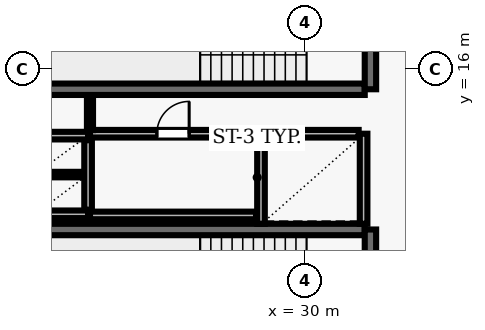
"""IFC4 building model, lengths in metres.
Left out: names, types, materials, properties, quantities, classifications, styles, units other than length and angle.
Written with IfcOpenShell. Run it as: python <this file> out.ifc"""

import sys

from ifc_helpers import new_model, si_unit, direction, frame, frame_2d, origin, place, context, subcontext, project, spatial, rectangle, extrude, element, fill, save


model = new_model("IFC4")
c1 = context("Model", 3, precision=1e-05, world=origin(), true_north=direction((0.0, 1.0)))
c2 = subcontext(c1, "Body", "Model", "MODEL_VIEW")
j1 = project(units=[si_unit("LENGTHUNIT", "METRE"), si_unit("PLANEANGLEUNIT", "RADIAN")], contexts=[c1])
p1 = place(None, origin())
s1 = spatial("IfcSite", under=j1, at=p1, CompositionType="ELEMENT")
p2 = place(p1, origin())
s2 = spatial("IfcBuilding", under=s1, at=p2, CompositionType="ELEMENT")
p3 = place(p2, frame((0.0, 0.0, 150.2)))
s3 = spatial("IfcBuildingStorey", under=s2, at=p3, CompositionType="ELEMENT", Elevation=150.2)
p4 = place(p3, frame((23.22, 15.47, 0.0), z_axis=(0.0, 0.0, 1.0), x_axis=(1.0, 0.0, 0.0)))
e1 = element("IfcWall", 1, at=p4, inside=s3, PredefinedType="SHEAR", context=c2, shape_type="SweptSolid", body=[
    extrude(rectangle(XDim=8.36, YDim=0.3, at=frame_2d((4.18, 0.0))), origin(), (0.0, 0.0, 1.0), 3.69),
])
p5 = place(p3, frame((31.73, 15.47, 0.0), z_axis=(0.0, 0.0, 1.0), x_axis=(0.0, 1.0, 0.0)))
e2 = element("IfcWall", 2, at=p5, inside=s3, PredefinedType="SHEAR", context=c2, shape_type="SweptSolid", body=[
    extrude(rectangle(XDim=3.51, YDim=0.3, at=frame_2d((1.755, 0.0))), origin(), (0.0, 0.0, 1.0), 3.69),
])
p6 = place(p5, frame((1.18, 0.0, 0.0)))
e3 = element("IfcOpeningElement", 3, at=p6, cuts=e2, PredefinedType="OPENING", context=c2, shape_type="SweptSolid", body=[
    extrude(rectangle(XDim=1.15, YDim=2.15, at=frame_2d((0.575, 1.075))), frame((0.0, 0.16, 0.0), z_axis=(0.0, -1.0, 0.0), x_axis=(1.0, 0.0, 0.0)), (0.0, 0.0, 1.0), 0.32),
])
p7 = place(p3, frame((31.58, 11.78, 0.0), z_axis=(0.0, 0.0, 1.0), x_axis=(-1.0, 0.0, 0.0)))
e4 = element("IfcWall", 4, at=p7, inside=s3, PredefinedType="SHEAR", context=c2, shape_type="SweptSolid", body=[
    extrude(rectangle(XDim=8.36, YDim=0.3, at=frame_2d((4.18, 0.0))), origin(), (0.0, 0.0, 1.0), 3.69),
])
p8 = place(p3, frame((31.73, 8.27, 0.0), z_axis=(0.0, 0.0, 1.0), x_axis=(0.0, 1.0, 0.0)))
e5 = element("IfcWall", 5, at=p8, inside=s3, PredefinedType="SHEAR", context=c2, shape_type="SweptSolid", body=[
    extrude(rectangle(XDim=3.51, YDim=0.3, at=frame_2d((1.755, 0.0))), origin(), (0.0, 0.0, 1.0), 3.69),
])
p9 = place(p8, frame((1.18, 0.0, 0.0)))
e6 = element("IfcOpeningElement", 6, at=p9, cuts=e5, PredefinedType="OPENING", context=c2, shape_type="SweptSolid", body=[
    extrude(rectangle(XDim=1.15, YDim=2.15, at=frame_2d((0.575, 1.075))), frame((0.0, 0.16, 0.0), z_axis=(0.0, -1.0, 0.0), x_axis=(1.0, 0.0, 0.0)), (0.0, 0.0, 1.0), 0.32),
])
for number, where, z_axis, x_axis in (
    (7, (28.85, 14.3, 0.0), (0.0, 0.0, 1.0), (0.0, -1.0, 0.0)),
    (8, (31.55, 11.93, 0.0), (0.0, 0.0, 1.0), (0.0, 1.0, 0.0)),
):
    element("IfcWall", number, at=place(p3, frame(where, z_axis=z_axis, x_axis=x_axis)), inside=s3, PredefinedType="SOLIDWALL", context=c2, shape_type="SweptSolid", body=[
        extrude(rectangle(XDim=2.37, YDim=0.2, at=frame_2d((1.185, 0.0))), origin(), (0.0, 0.0, 1.0), 3.69),
    ])
p10 = place(p3, frame((31.42, 14.3, 0.0), z_axis=(0.0, 0.0, 1.0), x_axis=(-1.0, 0.0, 0.0)))
e9 = element("IfcWall", 9, at=p10, inside=s3, PredefinedType="SOLIDWALL", context=c2, shape_type="SweptSolid", body=[
    extrude(rectangle(XDim=2.44, YDim=0.2, at=frame_2d((1.22, 0.0))), origin(), (0.0, 0.0, 1.0), 3.69),
])
for number, where, z_axis, x_axis in (
    (10, (22.9, 14.25, 0.0), (0.0, 0.0, 1.0), (1.0, 0.0, 0.0)),
    (11, (22.9, 12.18, 0.0), (0.0, 0.0, 1.0), (1.0, 0.0, 0.0)),
):
    element("IfcWall", number, at=place(p3, frame(where, z_axis=z_axis, x_axis=x_axis)), inside=s3, PredefinedType="SOLIDWALL", context=c2, shape_type="SweptSolid", body=[
        extrude(rectangle(XDim=1.4, YDim=0.2, at=frame_2d((0.7, 0.0))), origin(), (0.0, 0.0, 1.0), 3.69),
    ])
p11 = place(p3, frame((24.3, 12.3, 0.0), z_axis=(0.0, 0.0, 1.0), x_axis=(0.0, 1.0, 0.0)))
e12 = element("IfcWall", 12, at=p11, inside=s3, PredefinedType="SOLIDWALL", context=c2, shape_type="SweptSolid", body=[
    extrude(rectangle(XDim=1.83, YDim=0.2, at=frame_2d((0.915, 0.0))), origin(), (0.0, 0.0, 1.0), 3.69),
])
p12 = place(p3, frame((23.01, 13.225, 0.0), z_axis=(0.0, 0.0, 1.0), x_axis=(1.0, 0.0, 0.0)))
e13 = element("IfcWall", 13, at=p12, inside=s3, PredefinedType="PARTITIONING", context=c2, shape_type="SweptSolid", body=[
    extrude(rectangle(XDim=1.18, YDim=0.145, at=frame_2d((0.59, 0.0))), origin(), (0.0, 0.0, 1.0), 3.69),
])
p13 = place(p3, frame((24.35, 12.15, 0.0), z_axis=(0.0, 0.0, 1.0), x_axis=(1.0, 0.0, 0.0)))
e14 = element("IfcWall", 14, at=p13, inside=s3, PredefinedType="SOLIDWALL", context=c2, shape_type="SweptSolid", body=[
    extrude(rectangle(XDim=4.37, YDim=0.2, at=frame_2d((2.185, 0.0))), origin(), (0.0, 0.0, 1.0), 3.69),
])
p14 = place(p3, frame((24.35, 14.3, 0.0), z_axis=(0.0, 0.0, 1.0), x_axis=(1.0, 0.0, 0.0)))
e15 = element("IfcWall", 15, at=p14, inside=s3, PredefinedType="SOLIDWALL", context=c2, shape_type="SweptSolid", body=[
    extrude(rectangle(XDim=4.37, YDim=0.2, at=frame_2d((2.185, 0.0))), origin(), (0.0, 0.0, 1.0), 3.69),
])
p15 = place(p14, frame((1.76, 0.0, 0.0)))
e16 = element("IfcOpeningElement", 16, at=p15, cuts=e15, PredefinedType="OPENING", context=c2, shape_type="SweptSolid", body=[
    extrude(rectangle(XDim=0.85, YDim=2.1, at=frame_2d((0.425, 1.05))), frame((0.0, 0.11, 0.0), z_axis=(0.0, -1.0, 0.0), x_axis=(1.0, 0.0, 0.0)), (0.0, 0.0, 1.0), 0.22),
])
p16 = place(p3, frame((24.35, 15.29, 0.0), z_axis=(0.0, 0.0, 1.0), x_axis=(0.0, -1.0, 0.0)))
e17 = element("IfcWall", 17, at=p16, inside=s3, PredefinedType="PARTITIONING", context=c2, shape_type="SweptSolid", body=[
    extrude(rectangle(XDim=0.895, YDim=0.16, at=frame_2d((0.448, 0.0))), origin(), (0.0, 0.0, 1.0), 3.69),
])
p17 = place(p15, origin())
e18 = element("IfcDoor", 18, at=p17, inside=s3, OperationType="SINGLE_SWING_RIGHT", PredefinedType="DOOR", context=c2, shape_type="SweptSolid", body=[
    extrude(rectangle(XDim=0.85, YDim=2.1, at=frame_2d((0.425, 1.05))), frame((0.0, 0.025, 0.0), z_axis=(0.0, -1.0, 0.0), x_axis=(1.0, 0.0, 0.0)), (0.0, 0.0, 1.0), 0.05),
])
fill(e16, e18)
save(model, sys.argv[1])
